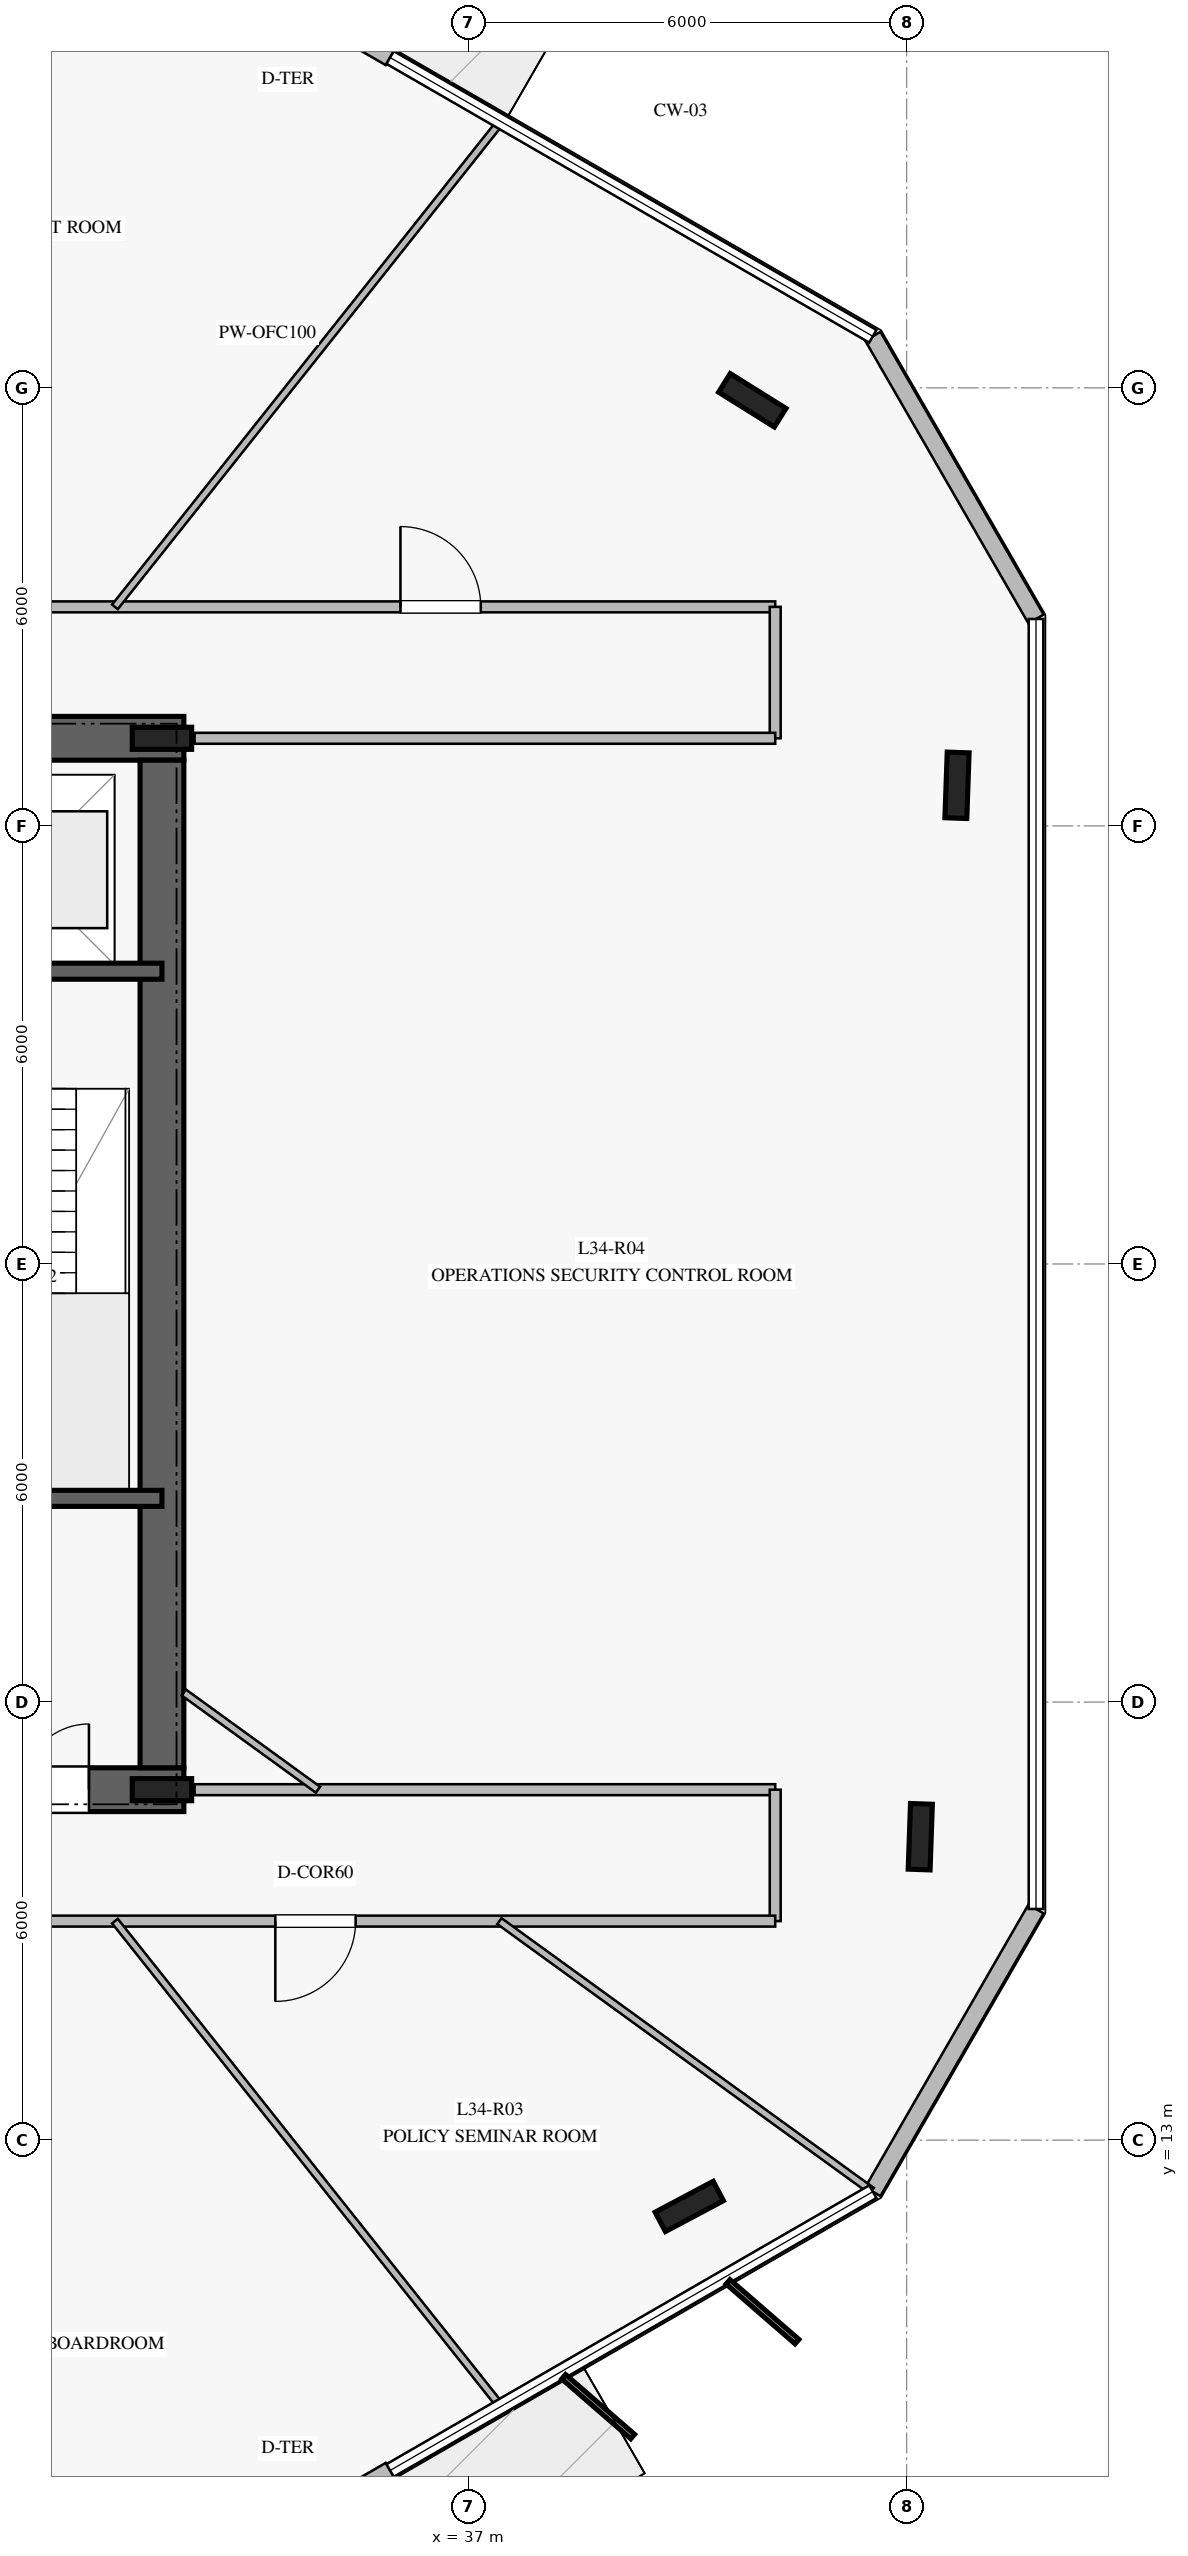
"""IFC4 building model, lengths in metres.
Left out: names, types, materials, properties, quantities, classifications, styles, units other than length and angle.
Written with IfcOpenShell. Run it as: python <this file> out.ifc"""

import sys

from ifc_helpers import new_model, si_unit, direction, frame, frame_2d, origin, origin_2d, place, context, subcontext, project, spatial, rectangle, i_section, extrude, element, fill, save


model = new_model("IFC4")
c1 = context("Model", 3, precision=1e-05, world=origin(), true_north=direction((0.0, 1.0)))
c2 = subcontext(c1, "Body", "Model", "MODEL_VIEW")
j1 = project(units=[si_unit("LENGTHUNIT", "METRE"), si_unit("PLANEANGLEUNIT", "RADIAN")], contexts=[c1])
p1 = place(None, origin())
s1 = spatial("IfcSite", under=j1, at=p1, CompositionType="ELEMENT")
p2 = place(p1, origin())
s2 = spatial("IfcBuilding", under=s1, at=p2, CompositionType="ELEMENT")
p3 = place(p2, frame((0.0, 0.0, 142.4)))
s3 = spatial("IfcBuildingStorey", under=s2, at=p3, CompositionType="ELEMENT", Elevation=142.4)
p4 = place(p3, frame((16.9, 17.8, 0.0), z_axis=(0.0, 0.0, 1.0), x_axis=(1.0, 0.0, 0.0)))
e1 = element("IfcWall", 1, at=p4, inside=s3, PredefinedType="SHEAR", context=c2, shape_type="SweptSolid", body=[
    extrude(rectangle(XDim=16.2, YDim=0.6, at=frame_2d((8.1, 0.0))), origin(), (0.0, 0.0, 1.0), 3.76),
])
p5 = place(p4, frame((5.05, 0.0, 0.0)))
e2 = element("IfcOpeningElement", 2, at=p5, cuts=e1, PredefinedType="OPENING", context=c2, shape_type="SweptSolid", body=[
    extrude(rectangle(XDim=1.2, YDim=2.25, at=frame_2d((0.6, 1.125))), frame((0.0, 0.31, 0.0), z_axis=(0.0, -1.0, 0.0), x_axis=(1.0, 0.0, 0.0)), (0.0, 0.0, 1.0), 0.62),
])
p6 = place(p4, frame((14.0, 0.0, 0.0)))
e3 = element("IfcOpeningElement", 3, at=p6, cuts=e1, PredefinedType="OPENING", context=c2, shape_type="SweptSolid", body=[
    extrude(rectangle(XDim=0.9, YDim=2.1, at=frame_2d((0.45, 1.05))), frame((0.0, 0.31, 0.0), z_axis=(0.0, -1.0, 0.0), x_axis=(1.0, 0.0, 0.0)), (0.0, 0.0, 1.0), 0.62),
])
p7 = place(p4, frame((9.25, 0.0, 0.0)))
e4 = element("IfcOpeningElement", 4, at=p7, cuts=e1, PredefinedType="OPENING", context=c2, shape_type="SweptSolid", body=[
    extrude(rectangle(XDim=1.1, YDim=2.2, at=frame_2d((0.55, 1.1))), frame((0.0, 0.31, 0.0), z_axis=(0.0, -1.0, 0.0), x_axis=(1.0, 0.0, 0.0)), (0.0, 0.0, 1.0), 0.62),
])
p8 = place(p3, frame((33.1, 32.2, 0.0), z_axis=(0.0, 0.0, 1.0), x_axis=(-1.0, 0.0, 0.0)))
e5 = element("IfcWall", 5, at=p8, inside=s3, PredefinedType="SHEAR", context=c2, shape_type="SweptSolid", body=[
    extrude(rectangle(XDim=16.2, YDim=0.6, at=frame_2d((8.1, 0.0))), origin(), (0.0, 0.0, 1.0), 3.76),
])
p9 = place(p8, frame((5.05, 0.0, 0.0)))
e6 = element("IfcOpeningElement", 6, at=p9, cuts=e5, PredefinedType="OPENING", context=c2, shape_type="SweptSolid", body=[
    extrude(rectangle(XDim=1.2, YDim=2.25, at=frame_2d((0.6, 1.125))), frame((0.0, 0.31, 0.0), z_axis=(0.0, -1.0, 0.0), x_axis=(1.0, 0.0, 0.0)), (0.0, 0.0, 1.0), 0.62),
])
p10 = place(p8, frame((11.85, 0.0, 0.0)))
e7 = element("IfcOpeningElement", 7, at=p10, cuts=e5, PredefinedType="OPENING", context=c2, shape_type="SweptSolid", body=[
    extrude(rectangle(XDim=1.1, YDim=2.2, at=frame_2d((0.55, 1.1))), frame((0.0, 0.31, 0.0), z_axis=(0.0, -1.0, 0.0), x_axis=(1.0, 0.0, 0.0)), (0.0, 0.0, 1.0), 0.62),
])
p11 = place(p8, frame((9.875, 0.0, 0.0)))
e8 = element("IfcOpeningElement", 8, at=p11, cuts=e5, PredefinedType="OPENING", context=c2, shape_type="SweptSolid", body=[
    extrude(rectangle(XDim=1.1, YDim=2.2, at=frame_2d((0.55, 1.1))), frame((0.0, 0.31, 0.0), z_axis=(0.0, -1.0, 0.0), x_axis=(1.0, 0.0, 0.0)), (0.0, 0.0, 1.0), 0.62),
])
p12 = place(p8, frame((7.9, 0.0, 0.0)))
e9 = element("IfcOpeningElement", 9, at=p12, cuts=e5, PredefinedType="OPENING", context=c2, shape_type="SweptSolid", body=[
    extrude(rectangle(XDim=1.1, YDim=2.2, at=frame_2d((0.55, 1.1))), frame((0.0, 0.31, 0.0), z_axis=(0.0, -1.0, 0.0), x_axis=(1.0, 0.0, 0.0)), (0.0, 0.0, 1.0), 0.62),
])
p13 = place(p3, frame((32.8, 18.1, 0.0), z_axis=(0.0, 0.0, 1.0), x_axis=(0.0, 1.0, 0.0)))
e10 = element("IfcWall", 10, at=p13, inside=s3, PredefinedType="SHEAR", context=c2, shape_type="SweptSolid", body=[
    extrude(rectangle(XDim=13.8, YDim=0.6, at=frame_2d((6.9, 0.0))), origin(), (0.0, 0.0, 1.0), 3.76),
])
for number, where, z_axis, x_axis in (
    (11, (32.8, 17.8, 0.0), (0.0, 0.0, 1.0), (1.0, 0.0, 0.0)),
    (12, (32.8, 32.2, 0.0), (0.0, 0.0, 1.0), (1.0, 0.0, 0.0)),
):
    element("IfcColumn", number, at=place(p3, frame(where, z_axis=z_axis, x_axis=x_axis)), inside=s3, PredefinedType="COLUMN", context=c2, shape_type="SweptSolid", body=[
        extrude(i_section(OverallWidth=0.303, OverallDepth=0.814, WebThickness=0.021, FlangeThickness=0.04, at=origin_2d()), origin(), (0.0, 0.0, 1.0), 4.0),
    ])
for number, where, z_axis, x_axis in (
    (13, (29.08, 21.79, 0.0), (0.0, 0.0, 1.0), (1.0, 0.0, 0.0)),
    (14, (29.08, 29.01, 0.0), (0.0, 0.0, 1.0), (1.0, 0.0, 0.0)),
):
    element("IfcWall", number, at=place(p3, frame(where, z_axis=z_axis, x_axis=x_axis)), inside=s3, PredefinedType="SOLIDWALL", context=c2, shape_type="SweptSolid", body=[
        extrude(rectangle(XDim=3.72, YDim=0.22, at=frame_2d((1.86, 0.0))), origin(), (0.0, 0.0, 1.0), 3.76),
    ])
for number, where, z_axis, x_axis in (
    (15, (40.886, 36.829, 0.0), (0.0, 0.0, 1.0), (-0.848, 0.53, 0.0)),
    (16, (40.023, 12.092, 0.0), (0.0, 0.0, 1.0), (0.883, 0.469, 0.0)),
    (17, (43.187, 17.156, 0.0), (0.0, 0.0, 1.0), (0.035, 0.999, 0.0)),
    (18, (43.69, 31.556, 0.0), (0.0, 0.0, 1.0), (0.035, 0.999, 0.0)),
):
    element("IfcColumn", number, at=place(p3, frame(where, z_axis=z_axis, x_axis=x_axis)), inside=s3, PredefinedType="COLUMN", context=c2, shape_type="SweptSolid", body=[
        extrude(i_section(OverallWidth=0.3, OverallDepth=0.9, WebThickness=0.019, FlangeThickness=0.035, at=origin_2d()), origin(), (0.0, 0.0, 1.0), 4.0),
    ])
p14 = place(p3, frame((35.925, 41.524, 0.0), z_axis=(0.0, 0.0, 1.0), x_axis=(-0.865955154139, 0.50012165622, 0.0)))
e19 = element("IfcWall", 19, at=p14, inside=s3, PredefinedType="STANDARD", context=c2, shape_type="SweptSolid", body=[
    extrude(rectangle(XDim=2.4, YDim=0.24, at=frame_2d((1.2, 0.0))), origin(), (0.0, 0.0, 1.0), 3.76),
])
p15 = place(p14, frame((0.4, 0.0, 0.0)))
e20 = element("IfcOpeningElement", 20, at=p15, cuts=e19, PredefinedType="OPENING", context=c2, shape_type="SweptSolid", body=[
    extrude(rectangle(XDim=1.6, YDim=2.25, at=frame_2d((0.8, 1.125))), frame((0.0, 0.13, 0.0), z_axis=(0.0, -1.0, 0.0), x_axis=(1.0, 0.0, 0.0)), (0.0, 0.0, 1.0), 0.26),
])
p16 = place(p3, frame((33.847, 7.276, 0.0), z_axis=(0.0, 0.0, 1.0), x_axis=(0.865955154139, 0.50012165622, 0.0)))
e21 = element("IfcWall", 21, at=p16, inside=s3, PredefinedType="STANDARD", context=c2, shape_type="SweptSolid", body=[
    extrude(rectangle(XDim=2.4, YDim=0.24, at=frame_2d((1.2, 0.0))), origin(), (0.0, 0.0, 1.0), 3.76),
])
p17 = place(p16, frame((0.4, 0.0, 0.0)))
e22 = element("IfcOpeningElement", 22, at=p17, cuts=e21, PredefinedType="OPENING", context=c2, shape_type="SweptSolid", body=[
    extrude(rectangle(XDim=1.6, YDim=2.25, at=frame_2d((0.8, 1.125))), frame((0.0, 0.13, 0.0), z_axis=(0.0, -1.0, 0.0), x_axis=(1.0, 0.0, 0.0)), (0.0, 0.0, 1.0), 0.26),
])
for number, where, z_axis, x_axis in (
    (23, (42.537, 12.294, 0.0), (0.0, 0.0, 1.0), (0.5, 0.866, 0.0)),
    (24, (44.772, 33.834, 0.0), (0.0, 0.0, 1.0), (-0.5, 0.866, 0.0)),
):
    element("IfcWall", number, at=place(p3, frame(where, z_axis=z_axis, x_axis=x_axis)), inside=s3, PredefinedType="STANDARD", context=c2, shape_type="SweptSolid", body=[
        extrude(rectangle(XDim=4.471, YDim=0.24, at=frame_2d((2.235, 0.0))), origin(), (0.0, 0.0, 1.0), 3.76),
    ])
p18 = place(p3, frame((25.95, 34.0, 0.0), z_axis=(0.0, 0.0, 1.0), x_axis=(1.0, 0.0, 0.0)))
e25 = element("IfcWall", 25, at=p18, inside=s3, PredefinedType="PARTITIONING", context=c2, shape_type="SweptSolid", body=[
    extrude(rectangle(XDim=15.25, YDim=0.15, at=frame_2d((7.625, 0.0))), origin(), (0.0, 0.0, 1.0), 3.21),
])
p19 = place(p18, frame((10.117, 0.0, 0.0)))
e26 = element("IfcOpeningElement", 26, at=p19, cuts=e25, PredefinedType="OPENING", context=c2, shape_type="SweptSolid", body=[
    extrude(rectangle(XDim=1.1, YDim=2.2, at=frame_2d((0.55, 1.1))), frame((0.0, 0.085, 0.0), z_axis=(0.0, -1.0, 0.0), x_axis=(1.0, 0.0, 0.0)), (0.0, 0.0, 1.0), 0.17),
])
p20 = place(p3, frame((41.2, 34.0, 0.0), z_axis=(0.0, 0.0, 1.0), x_axis=(0.0, -1.0, 0.0)))
e27 = element("IfcWall", 27, at=p20, inside=s3, PredefinedType="PARTITIONING", context=c2, shape_type="SweptSolid", body=[
    extrude(rectangle(XDim=1.8, YDim=0.15, at=frame_2d((0.9, 0.0))), origin(), (0.0, 0.0, 1.0), 3.76),
])
for number, where, z_axis, x_axis in (
    (28, (41.2, 32.2, 0.0), (0.0, 0.0, 1.0), (-1.0, 0.0, 0.0)),
    (29, (33.247, 17.8, 0.0), (0.0, 0.0, 1.0), (1.0, 0.0, 0.0)),
):
    element("IfcWall", number, at=place(p3, frame(where, z_axis=z_axis, x_axis=x_axis)), inside=s3, PredefinedType="PARTITIONING", context=c2, shape_type="SweptSolid", body=[
        extrude(rectangle(XDim=7.953, YDim=0.15, at=frame_2d((3.977, 0.0))), origin(), (0.0, 0.0, 1.0), 3.21),
    ])
p21 = place(p3, frame((41.2, 17.8, 0.0), z_axis=(0.0, 0.0, 1.0), x_axis=(0.0, -1.0, 0.0)))
e30 = element("IfcWall", 30, at=p21, inside=s3, PredefinedType="PARTITIONING", context=c2, shape_type="SweptSolid", body=[
    extrude(rectangle(XDim=1.8, YDim=0.15, at=frame_2d((0.9, 0.0))), origin(), (0.0, 0.0, 1.0), 3.21),
])
p22 = place(p3, frame((41.2, 16.0, 0.0), z_axis=(0.0, 0.0, 1.0), x_axis=(-1.0, 0.0, 0.0)))
e31 = element("IfcWall", 31, at=p22, inside=s3, PredefinedType="PARTITIONING", context=c2, shape_type="SweptSolid", body=[
    extrude(rectangle(XDim=15.25, YDim=0.15, at=frame_2d((7.625, 0.0))), origin(), (0.0, 0.0, 1.0), 3.21),
])
p23 = place(p22, frame((11.38, 0.0, 0.0)))
e32 = element("IfcOpeningElement", 32, at=p23, cuts=e31, PredefinedType="OPENING", context=c2, shape_type="SweptSolid", body=[
    extrude(rectangle(XDim=1.1, YDim=2.2, at=frame_2d((0.55, 1.1))), frame((0.0, 0.085, 0.0), z_axis=(0.0, -1.0, 0.0), x_axis=(1.0, 0.0, 0.0)), (0.0, 0.0, 1.0), 0.17),
])
p24 = place(p22, frame((5.747, 0.0, 0.0)))
e33 = element("IfcOpeningElement", 33, at=p24, cuts=e31, PredefinedType="OPENING", context=c2, shape_type="SweptSolid", body=[
    extrude(rectangle(XDim=1.1, YDim=2.2, at=frame_2d((0.55, 1.1))), frame((0.0, 0.085, 0.0), z_axis=(0.0, -1.0, 0.0), x_axis=(1.0, 0.0, 0.0)), (0.0, 0.0, 1.0), 0.17),
])
p25 = place(p3, frame((32.156, 34.0, 0.0), z_axis=(0.0, 0.0, 1.0), x_axis=(0.622366778273, 0.782725745905, 0.0)))
e34 = element("IfcWall", 34, at=p25, inside=s3, PredefinedType="MOVABLE", context=c2, shape_type="SweptSolid", body=[
    extrude(rectangle(XDim=8.476, YDim=0.1, at=frame_2d((4.238, 0.0))), origin(), (0.0, 0.0, 1.0), 3.16),
])
p26 = place(p3, frame((32.156, 16.0, 0.0), z_axis=(0.0, 0.0, 1.0), x_axis=(0.622366778273, -0.782725745905, 0.0)))
e35 = element("IfcWall", 35, at=p26, inside=s3, PredefinedType="MOVABLE", context=c2, shape_type="SweptSolid", body=[
    extrude(rectangle(XDim=8.476, YDim=0.1, at=frame_2d((4.238, 0.0))), origin(), (0.0, 0.0, 1.0), 3.05),
])
p27 = place(p3, frame((33.1, 19.131, 0.0), z_axis=(0.0, 0.0, 1.0), x_axis=(0.809758735958, -0.586762975604, 0.0)))
e36 = element("IfcWall", 36, at=p27, inside=s3, PredefinedType="MOVABLE", context=c2, shape_type="SweptSolid", body=[
    extrude(rectangle(XDim=2.269, YDim=0.1, at=frame_2d((1.134, 0.0))), origin(), (0.0, 0.0, 1.0), 3.21),
])
p28 = place(p3, frame((37.422, 16.0, 0.0), z_axis=(0.0, 0.0, 1.0), x_axis=(0.809732488646, -0.586799196345, 0.0)))
e37 = element("IfcWall", 37, at=p28, inside=s3, PredefinedType="MOVABLE", context=c2, shape_type="SweptSolid", body=[
    extrude(rectangle(XDim=6.297, YDim=0.1, at=frame_2d((3.148, 0.0))), origin(), (0.0, 0.0, 1.0), 3.16),
])
p29 = place(p6, origin())
e38 = element("IfcDoor", 38, at=p29, inside=s3, OperationType="SINGLE_SWING_RIGHT", PredefinedType="DOOR", context=c2, shape_type="SweptSolid", body=[
    extrude(rectangle(XDim=0.9, YDim=2.1, at=frame_2d((0.45, 1.05))), frame((0.0, 0.025, 0.0), z_axis=(0.0, -1.0, 0.0), x_axis=(1.0, 0.0, 0.0)), (0.0, 0.0, 1.0), 0.05),
])
fill(e3, e38)
p30 = place(p24, origin())
e39 = element("IfcDoor", 39, at=p30, inside=s3, OperationType="SINGLE_SWING_RIGHT", PredefinedType="DOOR", context=c2, shape_type="SweptSolid", body=[
    extrude(rectangle(XDim=1.1, YDim=2.2, at=frame_2d((0.55, 1.1))), frame((0.0, 0.025, 0.0), z_axis=(0.0, -1.0, 0.0), x_axis=(1.0, 0.0, 0.0)), (0.0, 0.0, 1.0), 0.05),
])
fill(e33, e39)
p31 = place(p19, origin())
e40 = element("IfcDoor", 40, at=p31, inside=s3, OperationType="SINGLE_SWING_LEFT", PredefinedType="DOOR", context=c2, shape_type="SweptSolid", body=[
    extrude(rectangle(XDim=1.1, YDim=2.2, at=frame_2d((0.55, 1.1))), frame((0.0, 0.025, 0.0), z_axis=(0.0, -1.0, 0.0), x_axis=(1.0, 0.0, 0.0)), (0.0, 0.0, 1.0), 0.05),
])
fill(e26, e40)
save(model, sys.argv[1])
